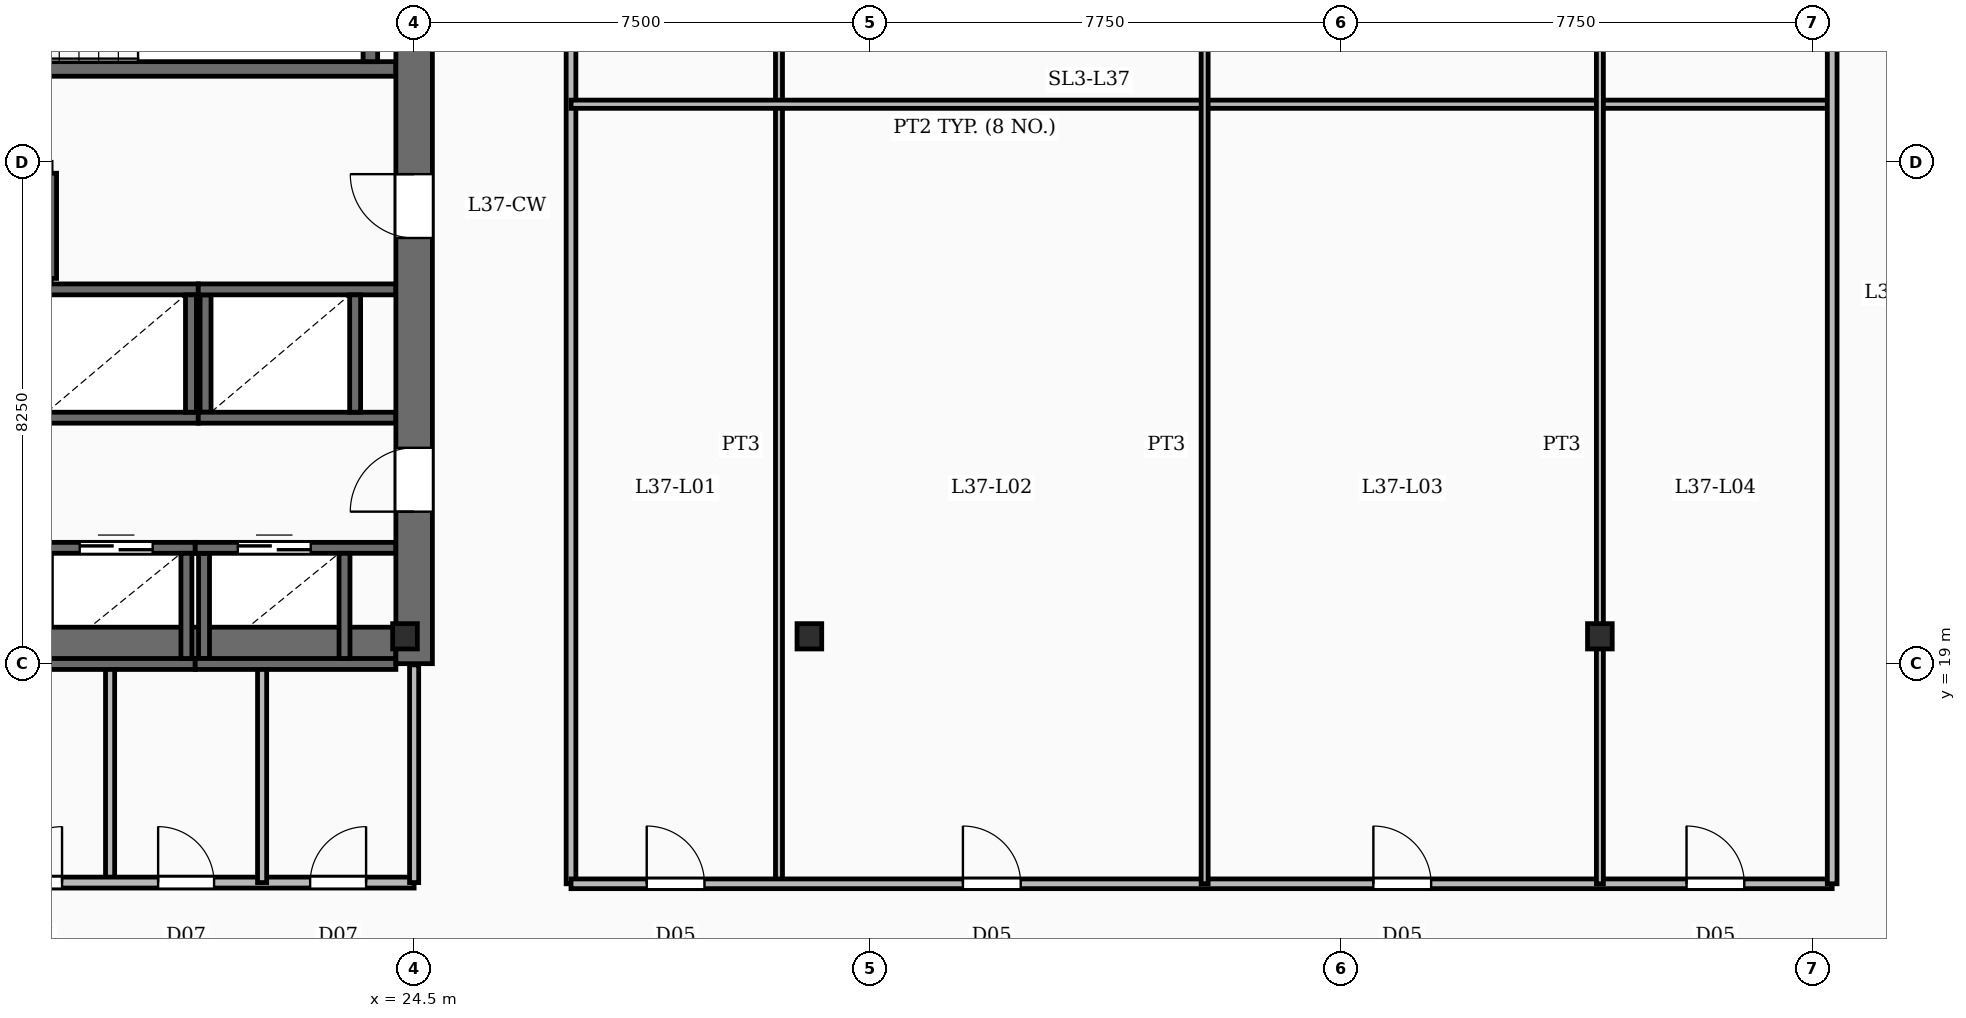
"""IFC4 building model, lengths in metres.
Left out: names, types, materials, properties, quantities, classifications, styles, units other than length and angle.
Written with IfcOpenShell. Run it as: python <this file> out.ifc"""

import sys

from ifc_helpers import new_model, si_unit, direction, frame, frame_2d, origin, origin_2d, place, context, subcontext, project, spatial, rectangle, i_section, extrude, element, fill, save


model = new_model("IFC4")
c1 = context("Model", 3, precision=1e-05, world=origin(), true_north=direction((0.0, 1.0)))
c2 = subcontext(c1, "Body", "Model", "MODEL_VIEW")
j1 = project(units=[si_unit("LENGTHUNIT", "METRE"), si_unit("PLANEANGLEUNIT", "RADIAN")], contexts=[c1])
p1 = place(None, origin())
s1 = spatial("IfcSite", under=j1, at=p1, CompositionType="ELEMENT")
p2 = place(p1, origin())
s2 = spatial("IfcBuilding", under=s1, at=p2, CompositionType="ELEMENT")
p3 = place(p2, frame((0.0, 0.0, 158.45)))
s3 = spatial("IfcBuildingStorey", under=s2, at=p3, CompositionType="ELEMENT", Elevation=158.45)
p4 = place(p3, frame((24.5, 19.0, -0.45), z_axis=(0.0, 0.0, 1.0), x_axis=(0.0, 1.0, 0.0)))
e1 = element("IfcWall", 1, at=p4, inside=s3, PredefinedType="SHEAR", context=c2, shape_type="SweptSolid", body=[
    extrude(rectangle(XDim=15.3, YDim=0.6, at=frame_2d((7.65, 0.0))), origin(), (0.0, 0.0, 1.0), 3.93),
])
p5 = place(p4, frame((2.5, 0.0, 0.45)))
e2 = element("IfcOpeningElement", 2, at=p5, cuts=e1, PredefinedType="OPENING", context=c2, shape_type="SweptSolid", body=[
    extrude(rectangle(XDim=1.05, YDim=2.15, at=frame_2d((0.525, 1.075))), frame((0.0, 0.31, 0.0), z_axis=(0.0, -1.0, 0.0), x_axis=(1.0, 0.0, 0.0)), (0.0, 0.0, 1.0), 0.62),
])
p6 = place(p4, frame((7.0, 0.0, 0.45)))
e3 = element("IfcOpeningElement", 3, at=p6, cuts=e1, PredefinedType="OPENING", context=c2, shape_type="SweptSolid", body=[
    extrude(rectangle(XDim=1.05, YDim=2.15, at=frame_2d((0.525, 1.075))), frame((0.0, 0.31, 0.0), z_axis=(0.0, -1.0, 0.0), x_axis=(1.0, 0.0, 0.0)), (0.0, 0.0, 1.0), 0.62),
])
p7 = place(p3, frame((14.7, 19.3, -0.45), z_axis=(0.0, 0.0, 1.0), x_axis=(1.0, 0.0, 0.0)))
e4 = element("IfcWall", 4, at=p7, inside=s3, PredefinedType="SHEAR", context=c2, shape_type="SweptSolid", body=[
    extrude(rectangle(XDim=9.5, YDim=0.6, at=frame_2d((4.75, 0.0))), origin(), (0.0, 0.0, 1.0), 3.93),
])
for number, where, z_axis, x_axis in (
    (5, (24.35, 19.45, -0.45), (0.0, 0.0, 1.0), (1.0, 0.0, 0.0)),
    (6, (31.0, 19.45, -0.45), (0.0, 0.0, 1.0), (1.0, 0.0, 0.0)),
    (7, (44.0, 19.45, -0.45), (0.0, 0.0, 1.0), (1.0, 0.0, 0.0)),
):
    element("IfcColumn", number, at=place(p3, frame(where, z_axis=z_axis, x_axis=x_axis)), inside=s3, PredefinedType="COLUMN", context=c2, shape_type="SweptSolid", body=[
        extrude(i_section(OverallWidth=0.406, OverallDepth=0.416, WebThickness=0.03, FlangeThickness=0.048, FilletRadius=0.02, at=origin_2d()), origin(), (0.0, 0.0, 1.0), 3.93),
    ])
p8 = place(p3, frame((24.2, 28.78, 0.0), z_axis=(0.0, 0.0, 1.0), x_axis=(-1.0, 0.0, 0.0)))
e8 = element("IfcWall", 8, at=p8, inside=s3, PredefinedType="SOLIDWALL", context=c2, shape_type="SweptSolid", body=[
    extrude(rectangle(XDim=9.5, YDim=0.24, at=frame_2d((4.75, 0.0))), origin(), (0.0, 0.0, 1.0), 3.48),
])
p9 = place(p8, frame((7.68, 0.0, 0.0)))
e9 = element("IfcOpeningElement", 9, at=p9, cuts=e8, PredefinedType="OPENING", context=c2, shape_type="SweptSolid", body=[
    extrude(rectangle(XDim=1.1, YDim=2.15, at=frame_2d((0.55, 1.075))), frame((0.0, 0.13, 0.0), z_axis=(0.0, -1.0, 0.0), x_axis=(1.0, 0.0, 0.0)), (0.0, 0.0, 1.0), 0.26),
])
p10 = place(p3, frame((23.78, 28.9, 0.0), z_axis=(0.0, 0.0, 1.0), x_axis=(0.0, 1.0, 0.0)))
e10 = element("IfcWall", 10, at=p10, inside=s3, PredefinedType="SOLIDWALL", context=c2, shape_type="SweptSolid", body=[
    extrude(rectangle(XDim=3.23, YDim=0.24, at=frame_2d((1.615, 0.0))), origin(), (0.0, 0.0, 1.0), 3.48),
])
p11 = place(p3, frame((18.3, 20.905, 0.0), z_axis=(0.0, 0.0, 1.0), x_axis=(1.0, 0.0, 0.0)))
e11 = element("IfcWall", 11, at=p11, inside=s3, PredefinedType="SOLIDWALL", context=c2, shape_type="SweptSolid", body=[
    extrude(rectangle(XDim=2.6, YDim=0.18, at=frame_2d((1.3, 0.0))), origin(), (0.0, 0.0, 1.0), 3.48),
])
p12 = place(p11, frame((0.7, 0.0, 0.0)))
e12 = element("IfcOpeningElement", 12, at=p12, cuts=e11, PredefinedType="OPENING", context=c2, shape_type="SweptSolid", body=[
    extrude(rectangle(XDim=1.2, YDim=2.2, at=frame_2d((0.6, 1.1))), frame((0.0, 0.1, 0.0), z_axis=(0.0, -1.0, 0.0), x_axis=(1.0, 0.0, 0.0)), (0.0, 0.0, 1.0), 0.2),
])
p13 = place(p3, frame((18.3, 18.995, 0.0), z_axis=(0.0, 0.0, 1.0), x_axis=(1.0, 0.0, 0.0)))
e13 = element("IfcWall", 13, at=p13, inside=s3, PredefinedType="SOLIDWALL", context=c2, shape_type="SweptSolid", body=[
    extrude(rectangle(XDim=2.6, YDim=0.18, at=frame_2d((1.3, 0.0))), origin(), (0.0, 0.0, 1.0), 3.48),
])
p14 = place(p3, frame((20.755, 19.085, 0.0), z_axis=(0.0, 0.0, 1.0), x_axis=(0.0, 1.0, 0.0)))
e14 = element("IfcWall", 14, at=p14, inside=s3, PredefinedType="SOLIDWALL", context=c2, shape_type="SweptSolid", body=[
    extrude(rectangle(XDim=1.73, YDim=0.18, at=frame_2d((0.865, 0.0))), origin(), (0.0, 0.0, 1.0), 3.48),
])
p15 = place(p3, frame((20.9, 20.905, 0.0), z_axis=(0.0, 0.0, 1.0), x_axis=(1.0, 0.0, 0.0)))
e15 = element("IfcWall", 15, at=p15, inside=s3, PredefinedType="SOLIDWALL", context=c2, shape_type="SweptSolid", body=[
    extrude(rectangle(XDim=3.3, YDim=0.18, at=frame_2d((1.65, 0.0))), origin(), (0.0, 0.0, 1.0), 3.48),
])
p16 = place(p15, frame((0.7, 0.0, 0.0)))
e16 = element("IfcOpeningElement", 16, at=p16, cuts=e15, PredefinedType="OPENING", context=c2, shape_type="SweptSolid", body=[
    extrude(rectangle(XDim=1.2, YDim=2.2, at=frame_2d((0.6, 1.1))), frame((0.0, 0.1, 0.0), z_axis=(0.0, -1.0, 0.0), x_axis=(1.0, 0.0, 0.0)), (0.0, 0.0, 1.0), 0.2),
])
p17 = place(p3, frame((20.9, 18.995, 0.0), z_axis=(0.0, 0.0, 1.0), x_axis=(1.0, 0.0, 0.0)))
e17 = element("IfcWall", 17, at=p17, inside=s3, PredefinedType="SOLIDWALL", context=c2, shape_type="SweptSolid", body=[
    extrude(rectangle(XDim=3.3, YDim=0.18, at=frame_2d((1.65, 0.0))), origin(), (0.0, 0.0, 1.0), 3.48),
])
for number, where, z_axis, x_axis in (
    (18, (21.045, 19.085, 0.0), (0.0, 0.0, 1.0), (0.0, 1.0, 0.0)),
    (19, (23.355, 19.085, 0.0), (0.0, 0.0, 1.0), (0.0, 1.0, 0.0)),
):
    element("IfcWall", number, at=place(p3, frame(where, z_axis=z_axis, x_axis=x_axis)), inside=s3, PredefinedType="SOLIDWALL", context=c2, shape_type="SweptSolid", body=[
        extrude(rectangle(XDim=1.73, YDim=0.18, at=frame_2d((0.865, 0.0))), origin(), (0.0, 0.0, 1.0), 3.48),
    ])
for number, where, z_axis, x_axis in (
    (20, (18.262, 25.155, 0.0), (0.0, 0.0, 1.0), (1.0, 0.0, 0.0)),
    (21, (18.262, 23.045, 0.0), (0.0, 0.0, 1.0), (1.0, 0.0, 0.0)),
):
    element("IfcWall", number, at=place(p3, frame(where, z_axis=z_axis, x_axis=x_axis)), inside=s3, PredefinedType="SOLIDWALL", context=c2, shape_type="SweptSolid", body=[
        extrude(rectangle(XDim=2.688, YDim=0.18, at=frame_2d((1.344, 0.0))), origin(), (0.0, 0.0, 1.0), 3.48),
    ])
p18 = place(p3, frame((20.83, 23.135, 0.0), z_axis=(0.0, 0.0, 1.0), x_axis=(0.0, 1.0, 0.0)))
e22 = element("IfcWall", 22, at=p18, inside=s3, PredefinedType="SOLIDWALL", context=c2, shape_type="SweptSolid", body=[
    extrude(rectangle(XDim=1.93, YDim=0.18, at=frame_2d((0.965, 0.0))), origin(), (0.0, 0.0, 1.0), 3.48),
])
for number, where, z_axis, x_axis in (
    (23, (20.95, 25.155, 0.0), (0.0, 0.0, 1.0), (1.0, 0.0, 0.0)),
    (24, (20.95, 23.045, 0.0), (0.0, 0.0, 1.0), (1.0, 0.0, 0.0)),
):
    element("IfcWall", number, at=place(p3, frame(where, z_axis=z_axis, x_axis=x_axis)), inside=s3, PredefinedType="SOLIDWALL", context=c2, shape_type="SweptSolid", body=[
        extrude(rectangle(XDim=3.25, YDim=0.18, at=frame_2d((1.625, 0.0))), origin(), (0.0, 0.0, 1.0), 3.48),
    ])
for number, where, z_axis, x_axis in (
    (25, (21.07, 23.135, 0.0), (0.0, 0.0, 1.0), (0.0, 1.0, 0.0)),
    (26, (23.53, 23.135, 0.0), (0.0, 0.0, 1.0), (0.0, 1.0, 0.0)),
):
    element("IfcWall", number, at=place(p3, frame(where, z_axis=z_axis, x_axis=x_axis)), inside=s3, PredefinedType="SOLIDWALL", context=c2, shape_type="SweptSolid", body=[
        extrude(rectangle(XDim=1.93, YDim=0.18, at=frame_2d((0.965, 0.0))), origin(), (0.0, 0.0, 1.0), 3.48),
    ])
p19 = place(p3, frame((18.53, 25.335, 0.0), z_axis=(0.0, 0.0, 1.0), x_axis=(0.0, 1.0, 0.0)))
e27 = element("IfcWall", 27, at=p19, inside=s3, PredefinedType="SOLIDWALL", context=c2, shape_type="SweptSolid", body=[
    extrude(rectangle(XDim=1.73, YDim=0.18, at=frame_2d((0.865, 0.0))), origin(), (0.0, 0.0, 1.0), 3.48),
])
for number, where, z_axis, x_axis in (
    (28, (19.5, 15.4, 0.0), (0.0, 0.0, 1.0), (0.0, 1.0, 0.0)),
    (29, (22.0, 15.4, 0.0), (0.0, 0.0, 1.0), (0.0, 1.0, 0.0)),
):
    element("IfcWall", number, at=place(p3, frame(where, z_axis=z_axis, x_axis=x_axis)), inside=s3, PredefinedType="PARTITIONING", context=c2, shape_type="SweptSolid", body=[
        extrude(rectangle(XDim=3.58, YDim=0.15, at=frame_2d((1.79, 0.0))), origin(), (0.0, 0.0, 1.0), 2.54),
    ])
p20 = place(p3, frame((14.6, 15.4, 0.0), z_axis=(0.0, 0.0, 1.0), x_axis=(1.0, 0.0, 0.0)))
e30 = element("IfcWall", 30, at=p20, inside=s3, PredefinedType="PARTITIONING", context=c2, shape_type="SweptSolid", body=[
    extrude(rectangle(XDim=9.9, YDim=0.18, at=frame_2d((4.95, 0.0))), origin(), (0.0, 0.0, 1.0), 2.54),
])
p21 = place(p20, frame((0.74, 0.0, 0.0)))
e31 = element("IfcOpeningElement", 31, at=p21, cuts=e30, PredefinedType="OPENING", context=c2, shape_type="SweptSolid", body=[
    extrude(rectangle(XDim=0.92, YDim=2.1, at=frame_2d((0.46, 1.05))), frame((0.0, 0.1, 0.0), z_axis=(0.0, -1.0, 0.0), x_axis=(1.0, 0.0, 0.0)), (0.0, 0.0, 1.0), 0.2),
])
p22 = place(p20, frame((3.19, 0.0, 0.0)))
e32 = element("IfcOpeningElement", 32, at=p22, cuts=e30, PredefinedType="OPENING", context=c2, shape_type="SweptSolid", body=[
    extrude(rectangle(XDim=0.92, YDim=2.1, at=frame_2d((0.46, 1.05))), frame((0.0, 0.1, 0.0), z_axis=(0.0, -1.0, 0.0), x_axis=(1.0, 0.0, 0.0)), (0.0, 0.0, 1.0), 0.2),
])
p23 = place(p20, frame((5.69, 0.0, 0.0)))
e33 = element("IfcOpeningElement", 33, at=p23, cuts=e30, PredefinedType="OPENING", context=c2, shape_type="SweptSolid", body=[
    extrude(rectangle(XDim=0.92, YDim=2.1, at=frame_2d((0.46, 1.05))), frame((0.0, 0.1, 0.0), z_axis=(0.0, -1.0, 0.0), x_axis=(1.0, 0.0, 0.0)), (0.0, 0.0, 1.0), 0.2),
])
p24 = place(p20, frame((8.19, 0.0, 0.0)))
e34 = element("IfcOpeningElement", 34, at=p24, cuts=e30, PredefinedType="OPENING", context=c2, shape_type="SweptSolid", body=[
    extrude(rectangle(XDim=0.92, YDim=2.1, at=frame_2d((0.46, 1.05))), frame((0.0, 0.1, 0.0), z_axis=(0.0, -1.0, 0.0), x_axis=(1.0, 0.0, 0.0)), (0.0, 0.0, 1.0), 0.2),
])
p25 = place(p3, frame((24.5, 15.4, 0.0), z_axis=(0.0, 0.0, 1.0), x_axis=(0.0, 1.0, 0.0)))
e35 = element("IfcWall", 35, at=p25, inside=s3, PredefinedType="PARTITIONING", context=c2, shape_type="SweptSolid", body=[
    extrude(rectangle(XDim=3.58, YDim=0.15, at=frame_2d((1.79, 0.0))), origin(), (0.0, 0.0, 1.0), 2.54),
])
for number, where, z_axis, x_axis in (
    (36, (30.5, 15.38, 0.0), (0.0, 0.0, 1.0), (0.0, 1.0, 0.0)),
    (37, (37.5, 15.38, 0.0), (0.0, 0.0, 1.0), (0.0, 1.0, 0.0)),
    (38, (44.0, 15.38, 0.0), (0.0, 0.0, 1.0), (0.0, 1.0, 0.0)),
):
    element("IfcWall", number, at=place(p3, frame(where, z_axis=z_axis, x_axis=x_axis)), inside=s3, PredefinedType="PARTITIONING", context=c2, shape_type="SweptSolid", body=[
        extrude(rectangle(XDim=20.6, YDim=0.115, at=frame_2d((10.3, 0.0))), origin(), (0.0, 0.0, 1.0), 2.54),
    ])
p26 = place(p3, frame((27.08, 28.2, 0.0), z_axis=(0.0, 0.0, 1.0), x_axis=(1.0, 0.0, 0.0)))
e39 = element("IfcWall", 39, at=p26, inside=s3, PredefinedType="PARTITIONING", context=c2, shape_type="SweptSolid", body=[
    extrude(rectangle(XDim=20.74, YDim=0.135, at=frame_2d((10.37, 0.0))), origin(), (0.0, 0.0, 1.0), 2.54),
])
p27 = place(p3, frame((27.08, 15.38, 0.0), z_axis=(0.0, 0.0, 1.0), x_axis=(1.0, 0.0, 0.0)))
e40 = element("IfcWall", 40, at=p27, inside=s3, PredefinedType="PARTITIONING", context=c2, shape_type="SweptSolid", body=[
    extrude(rectangle(XDim=20.74, YDim=0.16, at=frame_2d((10.37, 0.0))), origin(), (0.0, 0.0, 1.0), 2.54),
])
p28 = place(p27, frame((1.245, 0.0, 0.0)))
e41 = element("IfcOpeningElement", 41, at=p28, cuts=e40, PredefinedType="OPENING", context=c2, shape_type="SweptSolid", body=[
    extrude(rectangle(XDim=0.95, YDim=2.15, at=frame_2d((0.475, 1.075))), frame((0.0, 0.09, 0.0), z_axis=(0.0, -1.0, 0.0), x_axis=(1.0, 0.0, 0.0)), (0.0, 0.0, 1.0), 0.18),
])
p29 = place(p27, frame((6.445, 0.0, 0.0)))
e42 = element("IfcOpeningElement", 42, at=p29, cuts=e40, PredefinedType="OPENING", context=c2, shape_type="SweptSolid", body=[
    extrude(rectangle(XDim=0.95, YDim=2.15, at=frame_2d((0.475, 1.075))), frame((0.0, 0.09, 0.0), z_axis=(0.0, -1.0, 0.0), x_axis=(1.0, 0.0, 0.0)), (0.0, 0.0, 1.0), 0.18),
])
p30 = place(p27, frame((13.195, 0.0, 0.0)))
e43 = element("IfcOpeningElement", 43, at=p30, cuts=e40, PredefinedType="OPENING", context=c2, shape_type="SweptSolid", body=[
    extrude(rectangle(XDim=0.95, YDim=2.15, at=frame_2d((0.475, 1.075))), frame((0.0, 0.09, 0.0), z_axis=(0.0, -1.0, 0.0), x_axis=(1.0, 0.0, 0.0)), (0.0, 0.0, 1.0), 0.18),
])
p31 = place(p27, frame((18.345, 0.0, 0.0)))
e44 = element("IfcOpeningElement", 44, at=p31, cuts=e40, PredefinedType="OPENING", context=c2, shape_type="SweptSolid", body=[
    extrude(rectangle(XDim=0.95, YDim=2.15, at=frame_2d((0.475, 1.075))), frame((0.0, 0.09, 0.0), z_axis=(0.0, -1.0, 0.0), x_axis=(1.0, 0.0, 0.0)), (0.0, 0.0, 1.0), 0.18),
])
for number, where, z_axis, x_axis in (
    (45, (27.08, 15.38, 0.0), (0.0, 0.0, 1.0), (0.0, 1.0, 0.0)),
    (46, (47.82, 15.38, 0.0), (0.0, 0.0, 1.0), (0.0, 1.0, 0.0)),
):
    element("IfcWall", number, at=place(p3, frame(where, z_axis=z_axis, x_axis=x_axis)), inside=s3, PredefinedType="PARTITIONING", context=c2, shape_type="SweptSolid", body=[
        extrude(rectangle(XDim=20.6, YDim=0.16, at=frame_2d((10.3, 0.0))), origin(), (0.0, 0.0, 1.0), 2.54),
    ])
p32 = place(p5, origin())
e47 = element("IfcDoor", 47, at=p32, inside=s3, OperationType="SINGLE_SWING_LEFT", PredefinedType="DOOR", context=c2, shape_type="SweptSolid", body=[
    extrude(rectangle(XDim=1.05, YDim=2.15, at=frame_2d((0.525, 1.075))), frame((0.0, 0.025, 0.0), z_axis=(0.0, -1.0, 0.0), x_axis=(1.0, 0.0, 0.0)), (0.0, 0.0, 1.0), 0.05),
])
fill(e2, e47)
p33 = place(p6, origin())
e48 = element("IfcDoor", 48, at=p33, inside=s3, OperationType="SINGLE_SWING_RIGHT", PredefinedType="DOOR", context=c2, shape_type="SweptSolid", body=[
    extrude(rectangle(XDim=1.05, YDim=2.15, at=frame_2d((0.525, 1.075))), frame((0.0, 0.025, 0.0), z_axis=(0.0, -1.0, 0.0), x_axis=(1.0, 0.0, 0.0)), (0.0, 0.0, 1.0), 0.05),
])
fill(e3, e48)
p34 = place(p12, origin())
e49 = element("IfcDoor", 49, at=p34, inside=s3, OperationType="DOUBLE_DOOR_SLIDING", PredefinedType="DOOR", context=c2, shape_type="SweptSolid", body=[
    extrude(rectangle(XDim=1.2, YDim=2.2, at=frame_2d((0.6, 1.1))), frame((0.0, 0.025, 0.0), z_axis=(0.0, -1.0, 0.0), x_axis=(1.0, 0.0, 0.0)), (0.0, 0.0, 1.0), 0.05),
])
fill(e12, e49)
p35 = place(p16, origin())
e50 = element("IfcDoor", 50, at=p35, inside=s3, OperationType="DOUBLE_DOOR_SLIDING", PredefinedType="DOOR", context=c2, shape_type="SweptSolid", body=[
    extrude(rectangle(XDim=1.2, YDim=2.2, at=frame_2d((0.6, 1.1))), frame((0.0, 0.025, 0.0), z_axis=(0.0, -1.0, 0.0), x_axis=(1.0, 0.0, 0.0)), (0.0, 0.0, 1.0), 0.05),
])
fill(e16, e50)
p36 = place(p22, origin())
e51 = element("IfcDoor", 51, at=p36, inside=s3, OperationType="SINGLE_SWING_RIGHT", PredefinedType="DOOR", context=c2, shape_type="SweptSolid", body=[
    extrude(rectangle(XDim=0.92, YDim=2.1, at=frame_2d((0.46, 1.05))), frame((0.0, 0.025, 0.0), z_axis=(0.0, -1.0, 0.0), x_axis=(1.0, 0.0, 0.0)), (0.0, 0.0, 1.0), 0.05),
])
fill(e32, e51)
p37 = place(p23, origin())
e52 = element("IfcDoor", 52, at=p37, inside=s3, OperationType="SINGLE_SWING_LEFT", PredefinedType="DOOR", context=c2, shape_type="SweptSolid", body=[
    extrude(rectangle(XDim=0.92, YDim=2.1, at=frame_2d((0.46, 1.05))), frame((0.0, 0.025, 0.0), z_axis=(0.0, -1.0, 0.0), x_axis=(1.0, 0.0, 0.0)), (0.0, 0.0, 1.0), 0.05),
])
fill(e33, e52)
p38 = place(p24, origin())
e53 = element("IfcDoor", 53, at=p38, inside=s3, OperationType="SINGLE_SWING_RIGHT", PredefinedType="DOOR", context=c2, shape_type="SweptSolid", body=[
    extrude(rectangle(XDim=0.92, YDim=2.1, at=frame_2d((0.46, 1.05))), frame((0.0, 0.025, 0.0), z_axis=(0.0, -1.0, 0.0), x_axis=(1.0, 0.0, 0.0)), (0.0, 0.0, 1.0), 0.05),
])
fill(e34, e53)
p39 = place(p28, origin())
e54 = element("IfcDoor", 54, at=p39, inside=s3, OperationType="SINGLE_SWING_LEFT", PredefinedType="DOOR", context=c2, shape_type="SweptSolid", body=[
    extrude(rectangle(XDim=0.95, YDim=2.15, at=frame_2d((0.475, 1.075))), frame((0.0, 0.025, 0.0), z_axis=(0.0, -1.0, 0.0), x_axis=(1.0, 0.0, 0.0)), (0.0, 0.0, 1.0), 0.05),
])
fill(e41, e54)
p40 = place(p29, origin())
e55 = element("IfcDoor", 55, at=p40, inside=s3, OperationType="SINGLE_SWING_LEFT", PredefinedType="DOOR", context=c2, shape_type="SweptSolid", body=[
    extrude(rectangle(XDim=0.95, YDim=2.15, at=frame_2d((0.475, 1.075))), frame((0.0, 0.025, 0.0), z_axis=(0.0, -1.0, 0.0), x_axis=(1.0, 0.0, 0.0)), (0.0, 0.0, 1.0), 0.05),
])
fill(e42, e55)
p41 = place(p30, origin())
e56 = element("IfcDoor", 56, at=p41, inside=s3, OperationType="SINGLE_SWING_LEFT", PredefinedType="DOOR", context=c2, shape_type="SweptSolid", body=[
    extrude(rectangle(XDim=0.95, YDim=2.15, at=frame_2d((0.475, 1.075))), frame((0.0, 0.025, 0.0), z_axis=(0.0, -1.0, 0.0), x_axis=(1.0, 0.0, 0.0)), (0.0, 0.0, 1.0), 0.05),
])
fill(e43, e56)
p42 = place(p31, origin())
e57 = element("IfcDoor", 57, at=p42, inside=s3, OperationType="SINGLE_SWING_LEFT", PredefinedType="DOOR", context=c2, shape_type="SweptSolid", body=[
    extrude(rectangle(XDim=0.95, YDim=2.15, at=frame_2d((0.475, 1.075))), frame((0.0, 0.025, 0.0), z_axis=(0.0, -1.0, 0.0), x_axis=(1.0, 0.0, 0.0)), (0.0, 0.0, 1.0), 0.05),
])
fill(e44, e57)
save(model, sys.argv[1])
